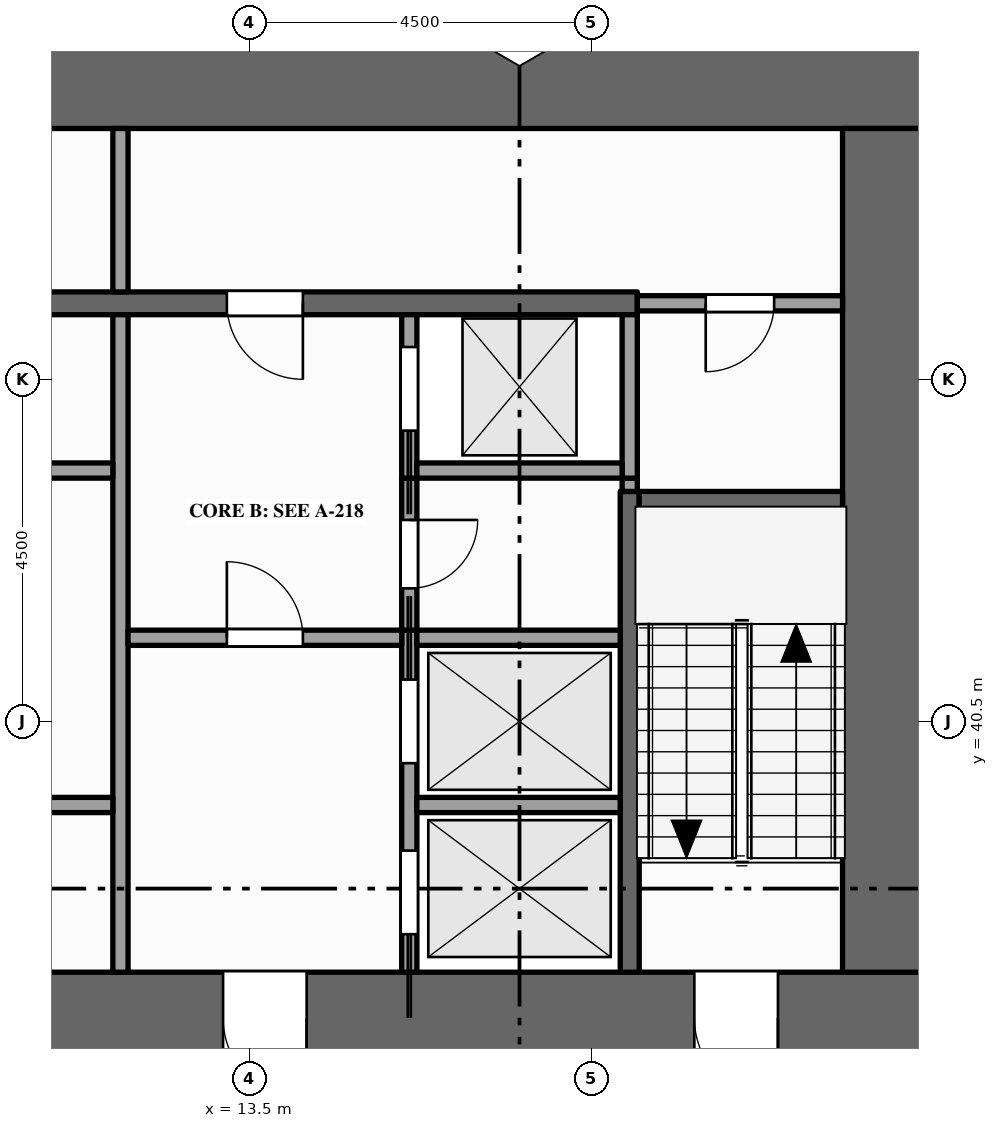
"""IFC4 building model, lengths in metres.
Left out: names, types, materials, properties, quantities, classifications, styles, units other than length and angle.
Written with IfcOpenShell. Run it as: python <this file> out.ifc"""

import sys

from ifc_helpers import new_model, si_unit, direction, frame, frame_2d, origin, place, context, subcontext, project, spatial, rectangle, extrude, element, fill, save


model = new_model("IFC4")
c1 = context("Model", 3, precision=1e-05, world=origin(), true_north=direction((0.0, 1.0)))
c2 = subcontext(c1, "Body", "Model", "MODEL_VIEW")
j1 = project(units=[si_unit("LENGTHUNIT", "METRE"), si_unit("PLANEANGLEUNIT", "RADIAN")], contexts=[c1])
p1 = place(None, origin())
s1 = spatial("IfcSite", under=j1, at=p1, CompositionType="ELEMENT")
p2 = place(p1, origin())
s2 = spatial("IfcBuilding", under=s1, at=p2, CompositionType="ELEMENT")
p3 = place(p2, frame((0.0, 0.0, 103.0)))
s3 = spatial("IfcBuildingStorey", under=s2, at=p3, CompositionType="ELEMENT", Elevation=103.0)
p4 = place(p3, frame((0.0, 36.6, -0.15), z_axis=(0.0, 0.0, 1.0), x_axis=(1.0, 0.0, 0.0)))
e1 = element("IfcWall", 1, at=p4, inside=s3, PredefinedType="SHEAR", context=c2, shape_type="SweptSolid", body=[
    extrude(rectangle(XDim=22.5, YDim=1.2, at=frame_2d((11.25, 0.0))), origin(), (0.0, 0.0, 1.0), 4.0),
])
p5 = place(p4, frame((7.1, 0.0, 0.15)))
e2 = element("IfcOpeningElement", 2, at=p5, cuts=e1, PredefinedType="OPENING", context=c2, shape_type="SweptSolid", body=[
    extrude(rectangle(XDim=1.8, YDim=2.1, at=frame_2d((0.9, 1.05))), frame((0.0, 0.61, 0.0), z_axis=(0.0, -1.0, 0.0), x_axis=(1.0, 0.0, 0.0)), (0.0, 0.0, 1.0), 1.22),
])
p6 = place(p4, frame((13.15, 0.0, 0.15)))
e3 = element("IfcOpeningElement", 3, at=p6, cuts=e1, PredefinedType="OPENING", context=c2, shape_type="SweptSolid", body=[
    extrude(rectangle(XDim=1.1, YDim=2.1, at=frame_2d((0.55, 1.05))), frame((0.0, 0.61, 0.0), z_axis=(0.0, -1.0, 0.0), x_axis=(1.0, 0.0, 0.0)), (0.0, 0.0, 1.0), 1.22),
])
p7 = place(p4, frame((2.15, 0.0, 0.15)))
e4 = element("IfcOpeningElement", 4, at=p7, cuts=e1, PredefinedType="OPENING", context=c2, shape_type="SweptSolid", body=[
    extrude(rectangle(XDim=1.1, YDim=2.1, at=frame_2d((0.55, 1.05))), frame((0.0, 0.61, 0.0), z_axis=(0.0, -1.0, 0.0), x_axis=(1.0, 0.0, 0.0)), (0.0, 0.0, 1.0), 1.22),
])
p8 = place(p4, frame((19.35, 0.0, 0.15)))
e5 = element("IfcOpeningElement", 5, at=p8, cuts=e1, PredefinedType="OPENING", context=c2, shape_type="SweptSolid", body=[
    extrude(rectangle(XDim=1.1, YDim=2.1, at=frame_2d((0.55, 1.05))), frame((0.0, 0.61, 0.0), z_axis=(0.0, -1.0, 0.0), x_axis=(1.0, 0.0, 0.0)), (0.0, 0.0, 1.0), 1.22),
])
p9 = place(p3, frame((0.0, 48.9, -0.15), z_axis=(0.0, 0.0, 1.0), x_axis=(1.0, 0.0, 0.0)))
e6 = element("IfcWall", 6, at=p9, inside=s3, PredefinedType="SHEAR", context=c2, shape_type="SweptSolid", body=[
    extrude(rectangle(XDim=22.5, YDim=1.2, at=frame_2d((11.25, 0.0))), origin(), (0.0, 0.0, 1.0), 4.0),
])
p10 = place(p3, frame((21.9, 37.2, -0.15), z_axis=(0.0, 0.0, 1.0), x_axis=(0.0, 1.0, 0.0)))
e7 = element("IfcWall", 7, at=p10, inside=s3, PredefinedType="SHEAR", context=c2, shape_type="SweptSolid", body=[
    extrude(rectangle(XDim=11.1, YDim=1.2, at=frame_2d((5.55, 0.0))), origin(), (0.0, 0.0, 1.0), 4.0),
])
p11 = place(p3, frame((11.8, 37.2, 0.0), z_axis=(0.0, 0.0, 1.0), x_axis=(0.0, 1.0, 0.0)))
e8 = element("IfcWall", 8, at=p11, inside=s3, PredefinedType="PARTITIONING", context=c2, shape_type="SweptSolid", body=[
    extrude(rectangle(XDim=8.65, YDim=0.2, at=frame_2d((4.325, 0.0))), origin(), (0.0, 0.0, 1.0), 3.85),
])
p12 = place(p3, frame((11.8, 46.15, 0.0), z_axis=(0.0, 0.0, 1.0), x_axis=(0.0, 1.0, 0.0)))
e9 = element("IfcWall", 9, at=p12, inside=s3, PredefinedType="PARTITIONING", context=c2, shape_type="SweptSolid", body=[
    extrude(rectangle(XDim=2.15, YDim=0.2, at=frame_2d((1.075, 0.0))), origin(), (0.0, 0.0, 1.0), 3.85),
])
p13 = place(p3, frame((15.6, 37.2, 0.0), z_axis=(0.0, 0.0, 1.0), x_axis=(0.0, 1.0, 0.0)))
e10 = element("IfcWall", 10, at=p13, inside=s3, PredefinedType="SOLIDWALL", context=c2, shape_type="SweptSolid", body=[
    extrude(rectangle(XDim=4.5, YDim=0.2, at=frame_2d((2.25, 0.0))), origin(), (0.0, 0.0, 1.0), 3.85),
])
p14 = place(p13, frame((0.5, 0.0, 0.012)))
e11 = element("IfcOpeningElement", 11, at=p14, cuts=e10, PredefinedType="OPENING", context=c2, shape_type="SweptSolid", body=[
    extrude(rectangle(XDim=1.1, YDim=2.1, at=frame_2d((0.55, 1.05))), frame((0.0, 0.11, 0.0), z_axis=(0.0, -1.0, 0.0), x_axis=(1.0, 0.0, 0.0)), (0.0, 0.0, 1.0), 0.22),
])
p15 = place(p13, frame((2.75, 0.0, 0.012)))
e12 = element("IfcOpeningElement", 12, at=p15, cuts=e10, PredefinedType="OPENING", context=c2, shape_type="SweptSolid", body=[
    extrude(rectangle(XDim=1.1, YDim=2.1, at=frame_2d((0.55, 1.05))), frame((0.0, 0.11, 0.0), z_axis=(0.0, -1.0, 0.0), x_axis=(1.0, 0.0, 0.0)), (0.0, 0.0, 1.0), 0.22),
])
p16 = place(p3, frame((15.6, 41.7, 0.0), z_axis=(0.0, 0.0, 1.0), x_axis=(0.0, 1.0, 0.0)))
e13 = element("IfcWall", 13, at=p16, inside=s3, PredefinedType="PARTITIONING", context=c2, shape_type="SweptSolid", body=[
    extrude(rectangle(XDim=2.0, YDim=0.2, at=frame_2d((1.0, 0.0))), origin(), (0.0, 0.0, 1.0), 3.85),
])
p17 = place(p16, frame((0.55, 0.0, 0.0)))
e14 = element("IfcOpeningElement", 14, at=p17, cuts=e13, PredefinedType="OPENING", context=c2, shape_type="SweptSolid", body=[
    extrude(rectangle(XDim=0.9, YDim=2.1, at=frame_2d((0.45, 1.05))), frame((0.0, 0.11, 0.0), z_axis=(0.0, -1.0, 0.0), x_axis=(1.0, 0.0, 0.0)), (0.0, 0.0, 1.0), 0.22),
])
p18 = place(p3, frame((15.6, 43.7, 0.0), z_axis=(0.0, 0.0, 1.0), x_axis=(0.0, 1.0, 0.0)))
e15 = element("IfcWall", 15, at=p18, inside=s3, PredefinedType="SOLIDWALL", context=c2, shape_type="SweptSolid", body=[
    extrude(rectangle(XDim=2.15, YDim=0.2, at=frame_2d((1.075, 0.0))), origin(), (0.0, 0.0, 1.0), 3.85),
])
p19 = place(p18, frame((0.625, 0.0, 0.012)))
e16 = element("IfcOpeningElement", 16, at=p19, cuts=e15, PredefinedType="OPENING", context=c2, shape_type="SweptSolid", body=[
    extrude(rectangle(XDim=1.1, YDim=2.1, at=frame_2d((0.55, 1.05))), frame((0.0, 0.11, 0.0), z_axis=(0.0, -1.0, 0.0), x_axis=(1.0, 0.0, 0.0)), (0.0, 0.0, 1.0), 0.22),
])
p20 = place(p3, frame((18.5, 37.2, 0.0), z_axis=(0.0, 0.0, 1.0), x_axis=(0.0, 1.0, 0.0)))
e17 = element("IfcWall", 17, at=p20, inside=s3, PredefinedType="SHEAR", context=c2, shape_type="SweptSolid", body=[
    extrude(rectangle(XDim=6.325, YDim=0.25, at=frame_2d((3.163, 0.0))), origin(), (0.0, 0.0, 1.0), 3.85),
])
p21 = place(p3, frame((18.5, 43.525, 0.0), z_axis=(0.0, 0.0, 1.0), x_axis=(0.0, 1.0, 0.0)))
e18 = element("IfcWall", 18, at=p21, inside=s3, PredefinedType="PARTITIONING", context=c2, shape_type="SweptSolid", body=[
    extrude(rectangle(XDim=0.175, YDim=0.2, at=frame_2d((0.087, 0.0))), origin(), (0.0, 0.0, 1.0), 3.85),
])
p22 = place(p3, frame((18.5, 43.7, 0.0), z_axis=(0.0, 0.0, 1.0), x_axis=(0.0, 1.0, 0.0)))
e19 = element("IfcWall", 19, at=p22, inside=s3, PredefinedType="SOLIDWALL", context=c2, shape_type="SweptSolid", body=[
    extrude(rectangle(XDim=2.15, YDim=0.2, at=frame_2d((1.075, 0.0))), origin(), (0.0, 0.0, 1.0), 3.85),
])
p23 = place(p3, frame((9.5, 39.4, 0.0), z_axis=(0.0, 0.0, 1.0), x_axis=(1.0, 0.0, 0.0)))
e20 = element("IfcWall", 20, at=p23, inside=s3, PredefinedType="PARTITIONING", context=c2, shape_type="SweptSolid", body=[
    extrude(rectangle(XDim=2.2, YDim=0.2, at=frame_2d((1.1, 0.0))), origin(), (0.0, 0.0, 1.0), 3.85),
])
p24 = place(p3, frame((15.7, 39.4, 0.0), z_axis=(0.0, 0.0, 1.0), x_axis=(1.0, 0.0, 0.0)))
e21 = element("IfcWall", 21, at=p24, inside=s3, PredefinedType="SOLIDWALL", context=c2, shape_type="SweptSolid", body=[
    extrude(rectangle(XDim=2.675, YDim=0.2, at=frame_2d((1.337, 0.0))), origin(), (0.0, 0.0, 1.0), 3.85),
])
p25 = place(p3, frame((11.9, 41.6, 0.0), z_axis=(0.0, 0.0, 1.0), x_axis=(1.0, 0.0, 0.0)))
e22 = element("IfcWall", 22, at=p25, inside=s3, PredefinedType="PARTITIONING", context=c2, shape_type="SweptSolid", body=[
    extrude(rectangle(XDim=3.6, YDim=0.2, at=frame_2d((1.8, 0.0))), origin(), (0.0, 0.0, 1.0), 3.85),
])
p26 = place(p25, frame((1.3, 0.0, 0.0)))
e23 = element("IfcOpeningElement", 23, at=p26, cuts=e22, PredefinedType="OPENING", context=c2, shape_type="SweptSolid", body=[
    extrude(rectangle(XDim=1.0, YDim=2.1, at=frame_2d((0.5, 1.05))), frame((0.0, 0.11, 0.0), z_axis=(0.0, -1.0, 0.0), x_axis=(1.0, 0.0, 0.0)), (0.0, 0.0, 1.0), 0.22),
])
p27 = place(p3, frame((15.7, 41.6, 0.0), z_axis=(0.0, 0.0, 1.0), x_axis=(1.0, 0.0, 0.0)))
e24 = element("IfcWall", 24, at=p27, inside=s3, PredefinedType="SOLIDWALL", context=c2, shape_type="SweptSolid", body=[
    extrude(rectangle(XDim=2.675, YDim=0.2, at=frame_2d((1.337, 0.0))), origin(), (0.0, 0.0, 1.0), 3.85),
])
p28 = place(p3, frame((18.625, 43.4, 0.0), z_axis=(0.0, 0.0, 1.0), x_axis=(1.0, 0.0, 0.0)))
e25 = element("IfcWall", 25, at=p28, inside=s3, PredefinedType="SHEAR", context=c2, shape_type="SweptSolid", body=[
    extrude(rectangle(XDim=2.675, YDim=0.25, at=frame_2d((1.337, 0.0))), origin(), (0.0, 0.0, 1.0), 3.85),
])
p29 = place(p3, frame((9.5, 43.8, 0.0), z_axis=(0.0, 0.0, 1.0), x_axis=(1.0, 0.0, 0.0)))
e26 = element("IfcWall", 26, at=p29, inside=s3, PredefinedType="PARTITIONING", context=c2, shape_type="SweptSolid", body=[
    extrude(rectangle(XDim=2.2, YDim=0.2, at=frame_2d((1.1, 0.0))), origin(), (0.0, 0.0, 1.0), 3.85),
])
p30 = place(p3, frame((15.7, 43.8, 0.0), z_axis=(0.0, 0.0, 1.0), x_axis=(1.0, 0.0, 0.0)))
e27 = element("IfcWall", 27, at=p30, inside=s3, PredefinedType="SOLIDWALL", context=c2, shape_type="SweptSolid", body=[
    extrude(rectangle(XDim=2.7, YDim=0.2, at=frame_2d((1.35, 0.0))), origin(), (0.0, 0.0, 1.0), 3.85),
])
p31 = place(p3, frame((4.1, 46.0, 0.0), z_axis=(0.0, 0.0, 1.0), x_axis=(1.0, 0.0, 0.0)))
e28 = element("IfcWall", 28, at=p31, inside=s3, PredefinedType="SHEAR", context=c2, shape_type="SweptSolid", body=[
    extrude(rectangle(XDim=14.5, YDim=0.3, at=frame_2d((7.25, 0.0))), origin(), (0.0, 0.0, 1.0), 3.85),
])
p32 = place(p31, frame((3.4, 0.0, 0.0)))
e29 = element("IfcOpeningElement", 29, at=p32, cuts=e28, PredefinedType="OPENING", context=c2, shape_type="SweptSolid", body=[
    extrude(rectangle(XDim=1.0, YDim=2.1, at=frame_2d((0.5, 1.05))), frame((0.0, 0.16, 0.0), z_axis=(0.0, -1.0, 0.0), x_axis=(1.0, 0.0, 0.0)), (0.0, 0.0, 1.0), 0.32),
])
p33 = place(p31, frame((9.1, 0.0, 0.0)))
e30 = element("IfcOpeningElement", 30, at=p33, cuts=e28, PredefinedType="OPENING", context=c2, shape_type="SweptSolid", body=[
    extrude(rectangle(XDim=1.0, YDim=2.1, at=frame_2d((0.5, 1.05))), frame((0.0, 0.16, 0.0), z_axis=(0.0, -1.0, 0.0), x_axis=(1.0, 0.0, 0.0)), (0.0, 0.0, 1.0), 0.32),
])
p34 = place(p3, frame((18.6, 46.0, 0.0), z_axis=(0.0, 0.0, 1.0), x_axis=(1.0, 0.0, 0.0)))
e31 = element("IfcWall", 31, at=p34, inside=s3, PredefinedType="PARTITIONING", context=c2, shape_type="SweptSolid", body=[
    extrude(rectangle(XDim=2.7, YDim=0.2, at=frame_2d((1.35, 0.0))), origin(), (0.0, 0.0, 1.0), 3.85),
])
p35 = place(p34, frame((0.9, 0.0, 0.0)))
e32 = element("IfcOpeningElement", 32, at=p35, cuts=e31, PredefinedType="OPENING", context=c2, shape_type="SweptSolid", body=[
    extrude(rectangle(XDim=0.9, YDim=2.1, at=frame_2d((0.45, 1.05))), frame((0.0, 0.11, 0.0), z_axis=(0.0, -1.0, 0.0), x_axis=(1.0, 0.0, 0.0)), (0.0, 0.0, 1.0), 0.22),
])
p36 = place(p14, origin())
e33 = element("IfcDoor", 33, at=p36, inside=s3, OperationType="SLIDING_TO_LEFT", PredefinedType="DOOR", context=c2, shape_type="SweptSolid", body=[
    extrude(rectangle(XDim=1.1, YDim=2.1, at=frame_2d((0.55, 1.05))), frame((0.0, 0.025, 0.0), z_axis=(0.0, -1.0, 0.0), x_axis=(1.0, 0.0, 0.0)), (0.0, 0.0, 1.0), 0.05),
])
fill(e11, e33)
p37 = place(p15, origin())
e34 = element("IfcDoor", 34, at=p37, inside=s3, OperationType="SLIDING_TO_RIGHT", PredefinedType="DOOR", context=c2, shape_type="SweptSolid", body=[
    extrude(rectangle(XDim=1.1, YDim=2.1, at=frame_2d((0.55, 1.05))), frame((0.0, 0.025, 0.0), z_axis=(0.0, -1.0, 0.0), x_axis=(1.0, 0.0, 0.0)), (0.0, 0.0, 1.0), 0.05),
])
fill(e12, e34)
p38 = place(p19, origin())
e35 = element("IfcDoor", 35, at=p38, inside=s3, OperationType="SLIDING_TO_LEFT", PredefinedType="DOOR", context=c2, shape_type="SweptSolid", body=[
    extrude(rectangle(XDim=1.1, YDim=2.1, at=frame_2d((0.55, 1.05))), frame((0.0, 0.025, 0.0), z_axis=(0.0, -1.0, 0.0), x_axis=(1.0, 0.0, 0.0)), (0.0, 0.0, 1.0), 0.05),
])
fill(e16, e35)
p39 = place(p6, origin())
e36 = element("IfcDoor", 36, at=p39, inside=s3, OperationType="SINGLE_SWING_RIGHT", PredefinedType="DOOR", context=c2, shape_type="SweptSolid", body=[
    extrude(rectangle(XDim=1.1, YDim=2.1, at=frame_2d((0.55, 1.05))), frame((0.0, 0.025, 0.0), z_axis=(0.0, -1.0, 0.0), x_axis=(1.0, 0.0, 0.0)), (0.0, 0.0, 1.0), 0.05),
])
fill(e3, e36)
p40 = place(p26, origin())
e37 = element("IfcDoor", 37, at=p40, inside=s3, OperationType="SINGLE_SWING_LEFT", PredefinedType="DOOR", context=c2, shape_type="SweptSolid", body=[
    extrude(rectangle(XDim=1.0, YDim=2.1, at=frame_2d((0.5, 1.05))), frame((0.0, 0.025, 0.0), z_axis=(0.0, -1.0, 0.0), x_axis=(1.0, 0.0, 0.0)), (0.0, 0.0, 1.0), 0.05),
])
fill(e23, e37)
p41 = place(p33, origin())
e38 = element("IfcDoor", 38, at=p41, inside=s3, OperationType="SINGLE_SWING_RIGHT", PredefinedType="DOOR", context=c2, shape_type="SweptSolid", body=[
    extrude(rectangle(XDim=1.0, YDim=2.1, at=frame_2d((0.5, 1.05))), frame((0.0, 0.025, 0.0), z_axis=(0.0, -1.0, 0.0), x_axis=(1.0, 0.0, 0.0)), (0.0, 0.0, 1.0), 0.05),
])
fill(e30, e38)
p42 = place(p8, origin())
e39 = element("IfcDoor", 39, at=p42, inside=s3, OperationType="SINGLE_SWING_RIGHT", PredefinedType="DOOR", context=c2, shape_type="SweptSolid", body=[
    extrude(rectangle(XDim=1.1, YDim=2.1, at=frame_2d((0.55, 1.05))), frame((0.0, 0.025, 0.0), z_axis=(0.0, -1.0, 0.0), x_axis=(1.0, 0.0, 0.0)), (0.0, 0.0, 1.0), 0.05),
])
fill(e5, e39)
p43 = place(p35, origin())
e40 = element("IfcDoor", 40, at=p43, inside=s3, OperationType="SINGLE_SWING_LEFT", PredefinedType="DOOR", context=c2, shape_type="SweptSolid", body=[
    extrude(rectangle(XDim=0.9, YDim=2.1, at=frame_2d((0.45, 1.05))), frame((0.0, 0.025, 0.0), z_axis=(0.0, -1.0, 0.0), x_axis=(1.0, 0.0, 0.0)), (0.0, 0.0, 1.0), 0.05),
])
fill(e32, e40)
p44 = place(p17, origin())
e41 = element("IfcDoor", 41, at=p44, inside=s3, OperationType="SINGLE_SWING_RIGHT", PredefinedType="DOOR", context=c2, shape_type="SweptSolid", body=[
    extrude(rectangle(XDim=0.9, YDim=2.1, at=frame_2d((0.45, 1.05))), frame((0.0, 0.025, 0.0), z_axis=(0.0, -1.0, 0.0), x_axis=(1.0, 0.0, 0.0)), (0.0, 0.0, 1.0), 0.05),
])
fill(e14, e41)
save(model, sys.argv[1])
